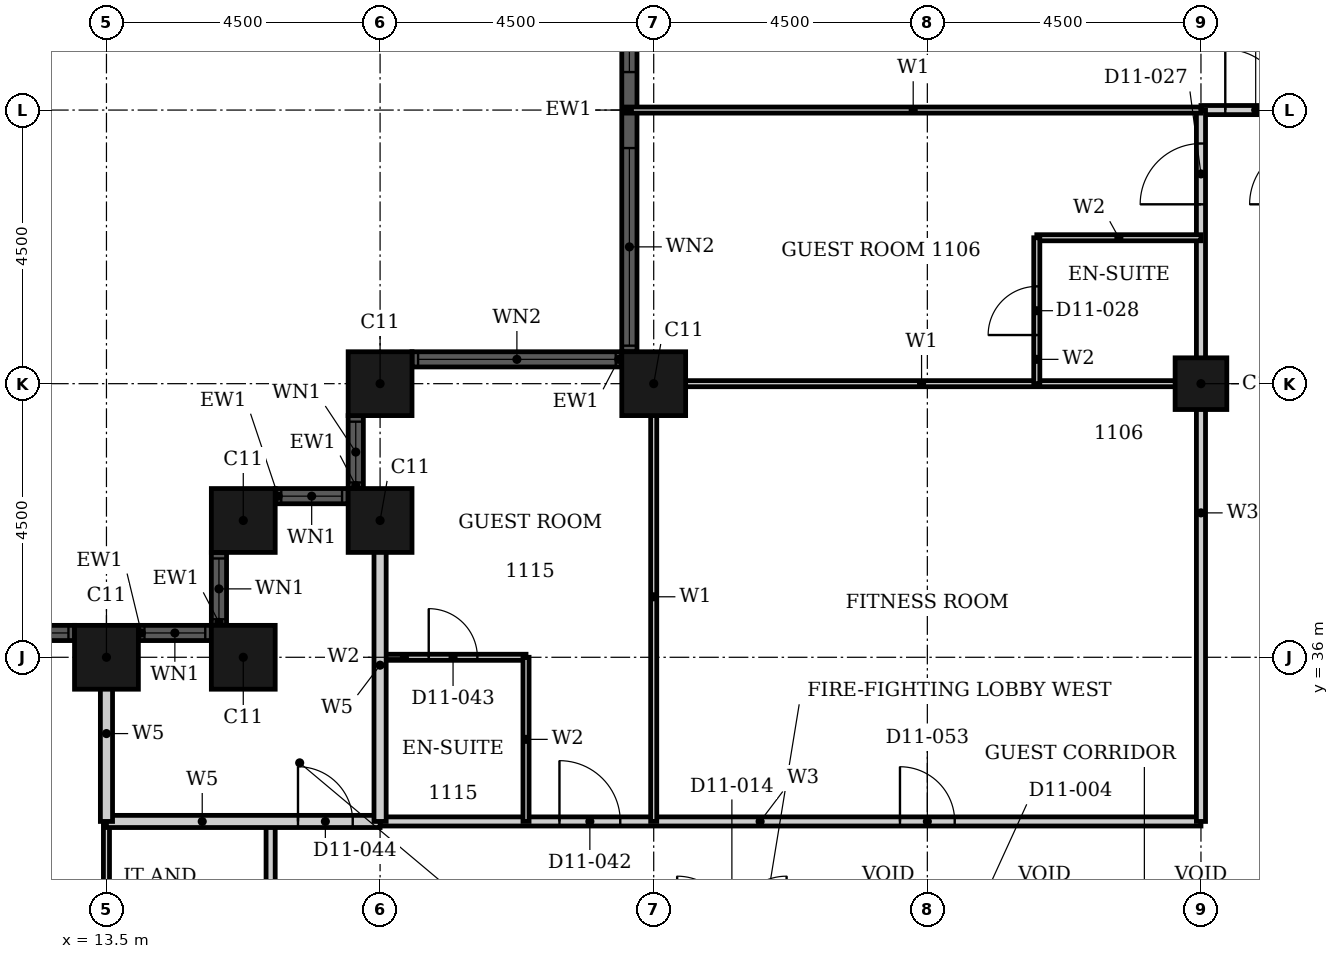
"""IFC4 building model, lengths in metres.
Left out: names, types, materials, properties, quantities, classifications, styles, units other than length and angle.
Written with IfcOpenShell. Run it as: python <this file> out.ifc"""

import sys

from ifc_helpers import new_model, si_unit, direction, frame, frame_2d, origin, origin_2d, place, context, subcontext, project, spatial, rectangle, hollow_rectangle, extrude, element, fill, save


model = new_model("IFC4")
c1 = context("Model", 3, precision=1e-05, world=origin(), true_north=direction((0.0, 1.0)))
c2 = subcontext(c1, "Body", "Model", "MODEL_VIEW")
j1 = project(units=[si_unit("LENGTHUNIT", "METRE"), si_unit("PLANEANGLEUNIT", "RADIAN")], contexts=[c1])
p1 = place(None, origin())
s1 = spatial("IfcSite", under=j1, at=p1, CompositionType="ELEMENT")
p2 = place(p1, origin())
s2 = spatial("IfcBuilding", under=s1, at=p2, CompositionType="ELEMENT")
p3 = place(p2, frame((0.0, 0.0, 52.8)))
s3 = spatial("IfcBuildingStorey", under=s2, at=p3, CompositionType="ELEMENT", Elevation=52.8)
for number, where, z_axis, x_axis in (
    (1, (22.5, 40.5, 0.0), (0.0, 0.0, 1.0), (1.0, 0.0, 0.0)),
    (2, (18.0, 40.5, 0.0), (0.0, 0.0, 1.0), (1.0, 0.0, 0.0)),
    (3, (18.0, 38.25, 0.0), (0.0, 0.0, 1.0), (1.0, 0.0, 0.0)),
    (4, (15.75, 38.25, 0.0), (0.0, 0.0, 1.0), (1.0, 0.0, 0.0)),
    (5, (15.75, 36.0, 0.0), (0.0, 0.0, 1.0), (1.0, 0.0, 0.0)),
    (6, (13.5, 36.0, 0.0), (0.0, 0.0, 1.0), (1.0, 0.0, 0.0)),
):
    element("IfcColumn", number, at=place(p3, frame(where, z_axis=z_axis, x_axis=x_axis)), inside=s3, PredefinedType="COLUMN", context=c2, shape_type="SweptSolid", body=[
        extrude(hollow_rectangle(XDim=1.05, YDim=1.05, WallThickness=0.034, at=origin_2d()), origin(), (0.0, 0.0, 1.0), 3.6),
    ])
p4 = place(p3, frame((31.5, 40.5, 0.0), z_axis=(0.0, 0.0, 1.0), x_axis=(1.0, 0.0, 0.0)))
e7 = element("IfcColumn", 7, at=p4, inside=s3, PredefinedType="COLUMN", context=c2, shape_type="SweptSolid", body=[
    extrude(hollow_rectangle(XDim=0.85, YDim=0.85, WallThickness=0.026, at=origin_2d()), origin(), (0.0, 0.0, 1.0), 3.6),
])
p5 = place(p3, frame((22.1, 48.975, 0.0), z_axis=(0.0, 0.0, 1.0), x_axis=(0.0, -1.0, 0.0)))
e8 = element("IfcWall", 8, at=p5, inside=s3, PredefinedType="SOLIDWALL", context=c2, shape_type="SweptSolid", body=[
    extrude(rectangle(XDim=7.95, YDim=0.25, at=frame_2d((3.975, 0.0))), origin(), (0.0, 0.0, 1.0), 3.6),
])
p6 = place(p5, frame((0.1, 0.0, 0.9)))
e9 = element("IfcOpeningElement", 9, at=p6, cuts=e8, PredefinedType="OPENING", context=c2, shape_type="SweptSolid", body=[
    extrude(rectangle(XDim=3.25, YDim=2.08, at=frame_2d((1.625, 1.04))), frame((0.0, 0.135, 0.0), z_axis=(0.0, -1.0, 0.0), x_axis=(1.0, 0.0, 0.0)), (0.0, 0.0, 1.0), 0.27),
])
p7 = place(p5, frame((4.6, 0.0, 0.9)))
e10 = element("IfcOpeningElement", 10, at=p7, cuts=e8, PredefinedType="OPENING", context=c2, shape_type="SweptSolid", body=[
    extrude(rectangle(XDim=3.25, YDim=2.08, at=frame_2d((1.625, 1.04))), frame((0.0, 0.135, 0.0), z_axis=(0.0, -1.0, 0.0), x_axis=(1.0, 0.0, 0.0)), (0.0, 0.0, 1.0), 0.27),
])
p8 = place(p3, frame((21.975, 40.9, 0.0), z_axis=(0.0, 0.0, 1.0), x_axis=(-1.0, 0.0, 0.0)))
e11 = element("IfcWall", 11, at=p8, inside=s3, PredefinedType="SOLIDWALL", context=c2, shape_type="SweptSolid", body=[
    extrude(rectangle(XDim=3.45, YDim=0.25, at=frame_2d((1.725, 0.0))), origin(), (0.0, 0.0, 1.0), 3.6),
])
p9 = place(p8, frame((0.1, 0.0, 0.9)))
e12 = element("IfcOpeningElement", 12, at=p9, cuts=e11, PredefinedType="OPENING", context=c2, shape_type="SweptSolid", body=[
    extrude(rectangle(XDim=3.25, YDim=2.08, at=frame_2d((1.625, 1.04))), frame((0.0, 0.135, 0.0), z_axis=(0.0, -1.0, 0.0), x_axis=(1.0, 0.0, 0.0)), (0.0, 0.0, 1.0), 0.27),
])
p10 = place(p3, frame((17.6, 39.975, 0.0), z_axis=(0.0, 0.0, 1.0), x_axis=(0.0, -1.0, 0.0)))
e13 = element("IfcWall", 13, at=p10, inside=s3, PredefinedType="SOLIDWALL", context=c2, shape_type="SweptSolid", body=[
    extrude(rectangle(XDim=1.2, YDim=0.25, at=frame_2d((0.6, 0.0))), origin(), (0.0, 0.0, 1.0), 3.6),
])
p11 = place(p10, frame((0.1, 0.0, 0.9)))
e14 = element("IfcOpeningElement", 14, at=p11, cuts=e13, PredefinedType="OPENING", context=c2, shape_type="SweptSolid", body=[
    extrude(rectangle(XDim=1.0, YDim=2.08, at=frame_2d((0.5, 1.04))), frame((0.0, 0.135, 0.0), z_axis=(0.0, -1.0, 0.0), x_axis=(1.0, 0.0, 0.0)), (0.0, 0.0, 1.0), 0.27),
])
p12 = place(p3, frame((17.475, 38.65, 0.0), z_axis=(0.0, 0.0, 1.0), x_axis=(-1.0, 0.0, 0.0)))
e15 = element("IfcWall", 15, at=p12, inside=s3, PredefinedType="SOLIDWALL", context=c2, shape_type="SweptSolid", body=[
    extrude(rectangle(XDim=1.2, YDim=0.25, at=frame_2d((0.6, 0.0))), origin(), (0.0, 0.0, 1.0), 3.6),
])
p13 = place(p12, frame((0.1, 0.0, 0.9)))
e16 = element("IfcOpeningElement", 16, at=p13, cuts=e15, PredefinedType="OPENING", context=c2, shape_type="SweptSolid", body=[
    extrude(rectangle(XDim=1.0, YDim=2.08, at=frame_2d((0.5, 1.04))), frame((0.0, 0.135, 0.0), z_axis=(0.0, -1.0, 0.0), x_axis=(1.0, 0.0, 0.0)), (0.0, 0.0, 1.0), 0.27),
])
p14 = place(p3, frame((15.35, 37.725, 0.0), z_axis=(0.0, 0.0, 1.0), x_axis=(0.0, -1.0, 0.0)))
e17 = element("IfcWall", 17, at=p14, inside=s3, PredefinedType="SOLIDWALL", context=c2, shape_type="SweptSolid", body=[
    extrude(rectangle(XDim=1.2, YDim=0.25, at=frame_2d((0.6, 0.0))), origin(), (0.0, 0.0, 1.0), 3.6),
])
p15 = place(p14, frame((0.1, 0.0, 0.9)))
e18 = element("IfcOpeningElement", 18, at=p15, cuts=e17, PredefinedType="OPENING", context=c2, shape_type="SweptSolid", body=[
    extrude(rectangle(XDim=1.0, YDim=2.08, at=frame_2d((0.5, 1.04))), frame((0.0, 0.135, 0.0), z_axis=(0.0, -1.0, 0.0), x_axis=(1.0, 0.0, 0.0)), (0.0, 0.0, 1.0), 0.27),
])
p16 = place(p3, frame((15.225, 36.4, 0.0), z_axis=(0.0, 0.0, 1.0), x_axis=(-1.0, 0.0, 0.0)))
e19 = element("IfcWall", 19, at=p16, inside=s3, PredefinedType="SOLIDWALL", context=c2, shape_type="SweptSolid", body=[
    extrude(rectangle(XDim=1.2, YDim=0.25, at=frame_2d((0.6, 0.0))), origin(), (0.0, 0.0, 1.0), 3.6),
])
p17 = place(p16, frame((0.1, 0.0, 0.9)))
e20 = element("IfcOpeningElement", 20, at=p17, cuts=e19, PredefinedType="OPENING", context=c2, shape_type="SweptSolid", body=[
    extrude(rectangle(XDim=1.0, YDim=2.08, at=frame_2d((0.5, 1.04))), frame((0.0, 0.135, 0.0), z_axis=(0.0, -1.0, 0.0), x_axis=(1.0, 0.0, 0.0)), (0.0, 0.0, 1.0), 0.27),
])
p18 = place(p3, frame((12.975, 36.4, 0.0), z_axis=(0.0, 0.0, 1.0), x_axis=(-1.0, 0.0, 0.0)))
e21 = element("IfcWall", 21, at=p18, inside=s3, PredefinedType="SOLIDWALL", context=c2, shape_type="SweptSolid", body=[
    extrude(rectangle(XDim=7.95, YDim=0.25, at=frame_2d((3.975, 0.0))), origin(), (0.0, 0.0, 1.0), 3.6),
])
p19 = place(p18, frame((0.1, 0.0, 0.9)))
e22 = element("IfcOpeningElement", 22, at=p19, cuts=e21, PredefinedType="OPENING", context=c2, shape_type="SweptSolid", body=[
    extrude(rectangle(XDim=3.25, YDim=2.08, at=frame_2d((1.625, 1.04))), frame((0.0, 0.135, 0.0), z_axis=(0.0, -1.0, 0.0), x_axis=(1.0, 0.0, 0.0)), (0.0, 0.0, 1.0), 0.27),
])
p20 = place(p18, frame((4.6, 0.0, 0.9)))
e23 = element("IfcOpeningElement", 23, at=p20, cuts=e21, PredefinedType="OPENING", context=c2, shape_type="SweptSolid", body=[
    extrude(rectangle(XDim=3.25, YDim=2.08, at=frame_2d((1.625, 1.04))), frame((0.0, 0.135, 0.0), z_axis=(0.0, -1.0, 0.0), x_axis=(1.0, 0.0, 0.0)), (0.0, 0.0, 1.0), 0.27),
])
p21 = place(p3, frame((18.0, 33.3, 0.0), z_axis=(0.0, 0.0, 1.0), x_axis=(1.0, 0.0, 0.0)))
e24 = element("IfcWall", 24, at=p21, inside=s3, PredefinedType="PARTITIONING", context=c2, shape_type="SweptSolid", body=[
    extrude(rectangle(XDim=13.5, YDim=0.15, at=frame_2d((6.75, 0.0))), origin(), (0.0, 0.0, 1.0), 3.3),
])
p22 = place(p21, frame((2.95, 0.0, 0.0)))
e25 = element("IfcOpeningElement", 25, at=p22, cuts=e24, PredefinedType="OPENING", context=c2, shape_type="SweptSolid", body=[
    extrude(rectangle(XDim=1.0, YDim=2.1, at=frame_2d((0.5, 1.05))), frame((0.0, 0.085, 0.0), z_axis=(0.0, -1.0, 0.0), x_axis=(1.0, 0.0, 0.0)), (0.0, 0.0, 1.0), 0.17),
])
p23 = place(p21, frame((8.55, 0.0, 0.0)))
e26 = element("IfcOpeningElement", 26, at=p23, cuts=e24, PredefinedType="OPENING", context=c2, shape_type="SweptSolid", body=[
    extrude(rectangle(XDim=0.9, YDim=2.1, at=frame_2d((0.45, 1.05))), frame((0.0, 0.085, 0.0), z_axis=(0.0, -1.0, 0.0), x_axis=(1.0, 0.0, 0.0)), (0.0, 0.0, 1.0), 0.17),
])
p24 = place(p3, frame((31.5, 45.0, 0.0), z_axis=(0.0, 0.0, 1.0), x_axis=(1.0, 0.0, 0.0)))
e27 = element("IfcWall", 27, at=p24, inside=s3, PredefinedType="PARTITIONING", context=c2, shape_type="SweptSolid", body=[
    extrude(rectangle(XDim=1.8, YDim=0.15, at=frame_2d((0.9, 0.0))), origin(), (0.0, 0.0, 1.0), 3.3),
])
p25 = place(p24, frame((0.4, 0.0, 0.0)))
e28 = element("IfcOpeningElement", 28, at=p25, cuts=e27, PredefinedType="OPENING", context=c2, shape_type="SweptSolid", body=[
    extrude(rectangle(XDim=1.0, YDim=2.1, at=frame_2d((0.5, 1.05))), frame((0.0, 0.085, 0.0), z_axis=(0.0, -1.0, 0.0), x_axis=(1.0, 0.0, 0.0)), (0.0, 0.0, 1.0), 0.17),
])
p26 = place(p3, frame((16.2, 27.0, 0.0), z_axis=(0.0, 0.0, 1.0), x_axis=(0.0, 1.0, 0.0)))
e29 = element("IfcWall", 29, at=p26, inside=s3, PredefinedType="PARTITIONING", context=c2, shape_type="SweptSolid", body=[
    extrude(rectangle(XDim=6.3, YDim=0.15, at=frame_2d((3.15, 0.0))), origin(), (0.0, 0.0, 1.0), 3.3),
])
p27 = place(p26, frame((2.55, 0.0, 0.0)))
e30 = element("IfcOpeningElement", 30, at=p27, cuts=e29, PredefinedType="OPENING", context=c2, shape_type="SweptSolid", body=[
    extrude(rectangle(XDim=0.9, YDim=2.1, at=frame_2d((0.45, 1.05))), frame((0.0, 0.085, 0.0), z_axis=(0.0, -1.0, 0.0), x_axis=(1.0, 0.0, 0.0)), (0.0, 0.0, 1.0), 0.17),
])
p28 = place(p3, frame((31.5, 33.3, 0.0), z_axis=(0.0, 0.0, 1.0), x_axis=(0.0, 1.0, 0.0)))
e31 = element("IfcWall", 31, at=p28, inside=s3, PredefinedType="PARTITIONING", context=c2, shape_type="SweptSolid", body=[
    extrude(rectangle(XDim=11.7, YDim=0.15, at=frame_2d((5.85, 0.0))), origin(), (0.0, 0.0, 1.0), 2.58),
])
p29 = place(p28, frame((10.15, 0.0, 0.0)))
e32 = element("IfcOpeningElement", 32, at=p29, cuts=e31, PredefinedType="OPENING", context=c2, shape_type="SweptSolid", body=[
    extrude(rectangle(XDim=1.0, YDim=2.1, at=frame_2d((0.5, 1.05))), frame((0.0, 0.085, 0.0), z_axis=(0.0, -1.0, 0.0), x_axis=(1.0, 0.0, 0.0)), (0.0, 0.0, 1.0), 0.17),
])
p30 = place(p3, frame((22.31, 40.5, 0.0), z_axis=(0.0, 0.0, 1.0), x_axis=(1.0, 0.0, 0.0)))
e33 = element("IfcWall", 33, at=p30, inside=s3, PredefinedType="PARTITIONING", context=c2, shape_type="SweptSolid", body=[
    extrude(rectangle(XDim=9.19, YDim=0.1, at=frame_2d((4.595, 0.0))), origin(), (0.0, 0.0, 1.0), 2.38),
])
p31 = place(p3, frame((22.035, 45.0, 0.0), z_axis=(0.0, 0.0, 1.0), x_axis=(1.0, 0.0, 0.0)))
e34 = element("IfcWall", 34, at=p31, inside=s3, PredefinedType="PARTITIONING", context=c2, shape_type="SweptSolid", body=[
    extrude(rectangle(XDim=9.465, YDim=0.1, at=frame_2d((4.732, 0.0))), origin(), (0.0, 0.0, 1.0), 3.3),
])
p32 = place(p3, frame((13.5, 27.0, 0.0), z_axis=(0.0, 0.0, 1.0), x_axis=(0.0, 1.0, 0.0)))
e35 = element("IfcWall", 35, at=p32, inside=s3, PredefinedType="PARTITIONING", context=c2, shape_type="SweptSolid", body=[
    extrude(rectangle(XDim=6.3, YDim=0.1, at=frame_2d((3.15, 0.0))), origin(), (0.0, 0.0, 1.0), 2.38),
])
p33 = place(p3, frame((22.5, 33.3, 0.0), z_axis=(0.0, 0.0, 1.0), x_axis=(0.0, 1.0, 0.0)))
e36 = element("IfcWall", 36, at=p33, inside=s3, PredefinedType="PARTITIONING", context=c2, shape_type="SweptSolid", body=[
    extrude(rectangle(XDim=7.39, YDim=0.1, at=frame_2d((3.695, 0.0))), origin(), (0.0, 0.0, 1.0), 3.3),
])
p34 = place(p3, frame((18.0, 36.0, 0.0), z_axis=(0.0, 0.0, 1.0), x_axis=(1.0, 0.0, 0.0)))
e37 = element("IfcWall", 37, at=p34, inside=s3, PredefinedType="PARTITIONING", context=c2, shape_type="SweptSolid", body=[
    extrude(rectangle(XDim=2.4, YDim=0.1, at=frame_2d((1.2, 0.0))), origin(), (0.0, 0.0, 1.0), 3.3),
])
p35 = place(p34, frame((0.8, 0.0, 0.0)))
e38 = element("IfcOpeningElement", 38, at=p35, cuts=e37, PredefinedType="OPENING", context=c2, shape_type="SweptSolid", body=[
    extrude(rectangle(XDim=0.8, YDim=2.1, at=frame_2d((0.4, 1.05))), frame((0.0, 0.06, 0.0), z_axis=(0.0, -1.0, 0.0), x_axis=(1.0, 0.0, 0.0)), (0.0, 0.0, 1.0), 0.12),
])
for number, where, z_axis, x_axis in (
    (39, (28.8, 42.9, 0.0), (0.0, 0.0, 1.0), (1.0, 0.0, 0.0)),
    (40, (20.4, 33.3, 0.0), (0.0, 0.0, 1.0), (0.0, 1.0, 0.0)),
):
    element("IfcWall", number, at=place(p3, frame(where, z_axis=z_axis, x_axis=x_axis)), inside=s3, PredefinedType="PARTITIONING", context=c2, shape_type="SweptSolid", body=[
        extrude(rectangle(XDim=2.7, YDim=0.1, at=frame_2d((1.35, 0.0))), origin(), (0.0, 0.0, 1.0), 3.3),
    ])
p36 = place(p3, frame((28.8, 40.5, 0.0), z_axis=(0.0, 0.0, 1.0), x_axis=(0.0, 1.0, 0.0)))
e41 = element("IfcWall", 41, at=p36, inside=s3, PredefinedType="PARTITIONING", context=c2, shape_type="SweptSolid", body=[
    extrude(rectangle(XDim=2.4, YDim=0.1, at=frame_2d((1.2, 0.0))), origin(), (0.0, 0.0, 1.0), 3.3),
])
p37 = place(p36, frame((0.8, 0.0, 0.0)))
e42 = element("IfcOpeningElement", 42, at=p37, cuts=e41, PredefinedType="OPENING", context=c2, shape_type="SweptSolid", body=[
    extrude(rectangle(XDim=0.8, YDim=2.1, at=frame_2d((0.4, 1.05))), frame((0.0, 0.06, 0.0), z_axis=(0.0, -1.0, 0.0), x_axis=(1.0, 0.0, 0.0)), (0.0, 0.0, 1.0), 0.12),
])
p38 = place(p3, frame((13.5, 33.3, 0.0), z_axis=(0.0, 0.0, 1.0), x_axis=(1.0, 0.0, 0.0)))
e43 = element("IfcWall", 43, at=p38, inside=s3, PredefinedType="PARTITIONING", context=c2, shape_type="SweptSolid", body=[
    extrude(rectangle(XDim=4.5, YDim=0.2, at=frame_2d((2.25, 0.0))), origin(), (0.0, 0.0, 1.0), 3.3),
])
p39 = place(p38, frame((3.15, 0.0, 0.0)))
e44 = element("IfcOpeningElement", 44, at=p39, cuts=e43, PredefinedType="OPENING", context=c2, shape_type="SweptSolid", body=[
    extrude(rectangle(XDim=0.9, YDim=2.1, at=frame_2d((0.45, 1.05))), frame((0.0, 0.11, 0.0), z_axis=(0.0, -1.0, 0.0), x_axis=(1.0, 0.0, 0.0)), (0.0, 0.0, 1.0), 0.22),
])
p40 = place(p3, frame((13.5, 33.3, 0.0), z_axis=(0.0, 0.0, 1.0), x_axis=(0.0, 1.0, 0.0)))
e45 = element("IfcWall", 45, at=p40, inside=s3, PredefinedType="PARTITIONING", context=c2, shape_type="SweptSolid", body=[
    extrude(rectangle(XDim=2.89, YDim=0.2, at=frame_2d((1.445, 0.0))), origin(), (0.0, 0.0, 1.0), 2.38),
])
p41 = place(p3, frame((18.0, 33.3, 0.0), z_axis=(0.0, 0.0, 1.0), x_axis=(0.0, 1.0, 0.0)))
e46 = element("IfcWall", 46, at=p41, inside=s3, PredefinedType="PARTITIONING", context=c2, shape_type="SweptSolid", body=[
    extrude(rectangle(XDim=5.14, YDim=0.2, at=frame_2d((2.57, 0.0))), origin(), (0.0, 0.0, 1.0), 3.3),
])
p42 = place(p6, origin())
e47 = element("IfcWindow", 47, at=p42, inside=s3, PartitioningType="SINGLE_PANEL", PredefinedType="WINDOW", context=c2, shape_type="SweptSolid", body=[
    extrude(rectangle(XDim=3.25, YDim=2.08, at=frame_2d((1.625, 1.04))), frame((0.0, 0.03, 0.0), z_axis=(0.0, -1.0, 0.0), x_axis=(1.0, 0.0, 0.0)), (0.0, 0.0, 1.0), 0.06),
])
fill(e9, e47)
p43 = place(p7, origin())
e48 = element("IfcWindow", 48, at=p43, inside=s3, PartitioningType="SINGLE_PANEL", PredefinedType="WINDOW", context=c2, shape_type="SweptSolid", body=[
    extrude(rectangle(XDim=3.25, YDim=2.08, at=frame_2d((1.625, 1.04))), frame((0.0, 0.03, 0.0), z_axis=(0.0, -1.0, 0.0), x_axis=(1.0, 0.0, 0.0)), (0.0, 0.0, 1.0), 0.06),
])
fill(e10, e48)
p44 = place(p9, origin())
e49 = element("IfcWindow", 49, at=p44, inside=s3, PartitioningType="SINGLE_PANEL", PredefinedType="WINDOW", context=c2, shape_type="SweptSolid", body=[
    extrude(rectangle(XDim=3.25, YDim=2.08, at=frame_2d((1.625, 1.04))), frame((0.0, 0.03, 0.0), z_axis=(0.0, -1.0, 0.0), x_axis=(1.0, 0.0, 0.0)), (0.0, 0.0, 1.0), 0.06),
])
fill(e12, e49)
p45 = place(p11, origin())
e50 = element("IfcWindow", 50, at=p45, inside=s3, PartitioningType="SINGLE_PANEL", PredefinedType="WINDOW", context=c2, shape_type="SweptSolid", body=[
    extrude(rectangle(XDim=1.0, YDim=2.08, at=frame_2d((0.5, 1.04))), frame((0.0, 0.03, 0.0), z_axis=(0.0, -1.0, 0.0), x_axis=(1.0, 0.0, 0.0)), (0.0, 0.0, 1.0), 0.06),
])
fill(e14, e50)
p46 = place(p13, origin())
e51 = element("IfcWindow", 51, at=p46, inside=s3, PartitioningType="SINGLE_PANEL", PredefinedType="WINDOW", context=c2, shape_type="SweptSolid", body=[
    extrude(rectangle(XDim=1.0, YDim=2.08, at=frame_2d((0.5, 1.04))), frame((0.0, 0.03, 0.0), z_axis=(0.0, -1.0, 0.0), x_axis=(1.0, 0.0, 0.0)), (0.0, 0.0, 1.0), 0.06),
])
fill(e16, e51)
p47 = place(p15, origin())
e52 = element("IfcWindow", 52, at=p47, inside=s3, PartitioningType="SINGLE_PANEL", PredefinedType="WINDOW", context=c2, shape_type="SweptSolid", body=[
    extrude(rectangle(XDim=1.0, YDim=2.08, at=frame_2d((0.5, 1.04))), frame((0.0, 0.03, 0.0), z_axis=(0.0, -1.0, 0.0), x_axis=(1.0, 0.0, 0.0)), (0.0, 0.0, 1.0), 0.06),
])
fill(e18, e52)
p48 = place(p17, origin())
e53 = element("IfcWindow", 53, at=p48, inside=s3, PartitioningType="SINGLE_PANEL", PredefinedType="WINDOW", context=c2, shape_type="SweptSolid", body=[
    extrude(rectangle(XDim=1.0, YDim=2.08, at=frame_2d((0.5, 1.04))), frame((0.0, 0.03, 0.0), z_axis=(0.0, -1.0, 0.0), x_axis=(1.0, 0.0, 0.0)), (0.0, 0.0, 1.0), 0.06),
])
fill(e20, e53)
p49 = place(p19, origin())
e54 = element("IfcWindow", 54, at=p49, inside=s3, PartitioningType="SINGLE_PANEL", PredefinedType="WINDOW", context=c2, shape_type="SweptSolid", body=[
    extrude(rectangle(XDim=3.25, YDim=2.08, at=frame_2d((1.625, 1.04))), frame((0.0, 0.03, 0.0), z_axis=(0.0, -1.0, 0.0), x_axis=(1.0, 0.0, 0.0)), (0.0, 0.0, 1.0), 0.06),
])
fill(e22, e54)
p50 = place(p29, origin())
e55 = element("IfcDoor", 55, at=p50, inside=s3, OperationType="SINGLE_SWING_RIGHT", PredefinedType="DOOR", context=c2, shape_type="SweptSolid", body=[
    extrude(rectangle(XDim=1.0, YDim=2.1, at=frame_2d((0.5, 1.05))), frame((0.0, 0.025, 0.0), z_axis=(0.0, -1.0, 0.0), x_axis=(1.0, 0.0, 0.0)), (0.0, 0.0, 1.0), 0.05),
])
fill(e32, e55)
p51 = place(p37, origin())
e56 = element("IfcDoor", 56, at=p51, inside=s3, OperationType="SINGLE_SWING_RIGHT", PredefinedType="DOOR", context=c2, shape_type="SweptSolid", body=[
    extrude(rectangle(XDim=0.8, YDim=2.1, at=frame_2d((0.4, 1.05))), frame((0.0, 0.025, 0.0), z_axis=(0.0, -1.0, 0.0), x_axis=(1.0, 0.0, 0.0)), (0.0, 0.0, 1.0), 0.05),
])
fill(e42, e56)
p52 = place(p25, origin())
e57 = element("IfcDoor", 57, at=p52, inside=s3, OperationType="SINGLE_SWING_RIGHT", PredefinedType="DOOR", context=c2, shape_type="SweptSolid", body=[
    extrude(rectangle(XDim=1.0, YDim=2.1, at=frame_2d((0.5, 1.05))), frame((0.0, 0.025, 0.0), z_axis=(0.0, -1.0, 0.0), x_axis=(1.0, 0.0, 0.0)), (0.0, 0.0, 1.0), 0.05),
])
fill(e28, e57)
p53 = place(p22, origin())
e58 = element("IfcDoor", 58, at=p53, inside=s3, OperationType="SINGLE_SWING_RIGHT", PredefinedType="DOOR", context=c2, shape_type="SweptSolid", body=[
    extrude(rectangle(XDim=1.0, YDim=2.1, at=frame_2d((0.5, 1.05))), frame((0.0, 0.025, 0.0), z_axis=(0.0, -1.0, 0.0), x_axis=(1.0, 0.0, 0.0)), (0.0, 0.0, 1.0), 0.05),
])
fill(e25, e58)
p54 = place(p35, origin())
e59 = element("IfcDoor", 59, at=p54, inside=s3, OperationType="SINGLE_SWING_RIGHT", PredefinedType="DOOR", context=c2, shape_type="SweptSolid", body=[
    extrude(rectangle(XDim=0.8, YDim=2.1, at=frame_2d((0.4, 1.05))), frame((0.0, 0.025, 0.0), z_axis=(0.0, -1.0, 0.0), x_axis=(1.0, 0.0, 0.0)), (0.0, 0.0, 1.0), 0.05),
])
fill(e38, e59)
p55 = place(p39, origin())
e60 = element("IfcDoor", 60, at=p55, inside=s3, OperationType="SINGLE_SWING_RIGHT", PredefinedType="DOOR", context=c2, shape_type="SweptSolid", body=[
    extrude(rectangle(XDim=0.9, YDim=2.1, at=frame_2d((0.45, 1.05))), frame((0.0, 0.025, 0.0), z_axis=(0.0, -1.0, 0.0), x_axis=(1.0, 0.0, 0.0)), (0.0, 0.0, 1.0), 0.05),
])
fill(e44, e60)
p56 = place(p23, origin())
e61 = element("IfcDoor", 61, at=p56, inside=s3, OperationType="SINGLE_SWING_RIGHT", PredefinedType="DOOR", context=c2, shape_type="SweptSolid", body=[
    extrude(rectangle(XDim=0.9, YDim=2.1, at=frame_2d((0.45, 1.05))), frame((0.0, 0.025, 0.0), z_axis=(0.0, -1.0, 0.0), x_axis=(1.0, 0.0, 0.0)), (0.0, 0.0, 1.0), 0.05),
])
fill(e26, e61)
save(model, sys.argv[1])
